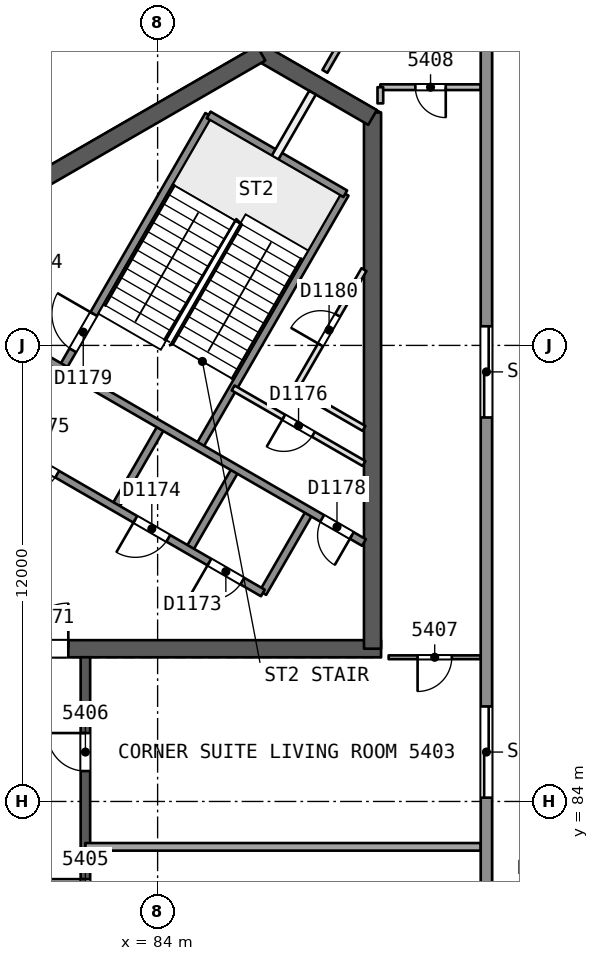
"""IFC4 building model, lengths in metres.
Left out: names, types, materials, properties, quantities, classifications, styles, units other than length and angle.
Written with IfcOpenShell. Run it as: python <this file> out.ifc"""

import sys

from ifc_helpers import new_model, si_unit, direction, frame, frame_2d, origin, place, context, subcontext, project, spatial, rectangle, extrude, element, fill, save


model = new_model("IFC4")
c1 = context("Model", 3, precision=1e-05, world=origin(), true_north=direction((0.0, 1.0)))
c2 = subcontext(c1, "Body", "Model", "MODEL_VIEW")
j1 = project(units=[si_unit("LENGTHUNIT", "METRE"), si_unit("PLANEANGLEUNIT", "RADIAN")], contexts=[c1])
p1 = place(None, origin())
s1 = spatial("IfcSite", under=j1, at=p1, CompositionType="ELEMENT")
p2 = place(p1, origin())
s2 = spatial("IfcBuilding", under=s1, at=p2, CompositionType="ELEMENT")
p3 = place(p2, frame((0.0, 0.0, 220.6)))
s3 = spatial("IfcBuildingStorey", under=s2, at=p3, CompositionType="ELEMENT", Elevation=220.6)
p4 = place(p3, frame((79.63, 88.019, 0.0), z_axis=(0.0, 0.0, 1.0), x_axis=(1.0, 0.0, 0.0)))
e1 = element("IfcWall", 1, at=p4, inside=s3, PredefinedType="SHEAR", context=c2, shape_type="SweptSolid", body=[
    extrude(rectangle(XDim=10.25, YDim=0.45, at=frame_2d((5.125, 0.0))), origin(), (0.0, 0.0, 1.0), 3.7),
])
p5 = place(p4, frame((0.82, 0.0, 0.0)))
e2 = element("IfcOpeningElement", 2, at=p5, cuts=e1, PredefinedType="OPENING", context=c2, shape_type="SweptSolid", body=[
    extrude(rectangle(XDim=1.2, YDim=2.1, at=frame_2d((0.6, 1.05))), frame((0.0, 0.235, 0.0), z_axis=(0.0, -1.0, 0.0), x_axis=(1.0, 0.0, 0.0)), (0.0, 0.0, 1.0), 0.471),
])
p6 = place(p3, frame((89.655, 88.019, 0.0), z_axis=(0.0, 0.0, 1.0), x_axis=(0.0, 1.0, 0.0)))
e3 = element("IfcWall", 3, at=p6, inside=s3, PredefinedType="SHEAR", context=c2, shape_type="SweptSolid", body=[
    extrude(rectangle(XDim=14.108, YDim=0.45, at=frame_2d((7.054, 0.0))), origin(), (0.0, 0.0, 1.0), 3.7),
])
p7 = place(p3, frame((89.655, 101.998, 0.0), z_axis=(0.0, 0.0, 1.0), x_axis=(-0.866042179588, 0.49997094233, 0.0)))
e4 = element("IfcWall", 4, at=p7, inside=s3, PredefinedType="SHEAR", context=c2, shape_type="SweptSolid", body=[
    extrude(rectangle(XDim=3.515, YDim=0.45, at=frame_2d((1.758, 0.0))), origin(), (0.0, 0.0, 1.0), 3.7),
])
p8 = place(p3, frame((86.723, 103.69, 0.0), z_axis=(0.0, 0.0, 1.0), x_axis=(-0.866022713978, -0.500004658852, 0.0)))
e5 = element("IfcWall", 5, at=p8, inside=s3, PredefinedType="SHEAR", context=c2, shape_type="SweptSolid", body=[
    extrude(rectangle(XDim=14.203, YDim=0.45, at=frame_2d((7.102, 0.0))), origin(), (0.0, 0.0, 1.0), 3.7),
])
p9 = place(p3, frame((82.1, 72.206, 0.0), z_axis=(0.0, 0.0, 1.0), x_axis=(0.0, 1.0, 0.0)))
e6 = element("IfcWall", 6, at=p9, inside=s3, PredefinedType="SHEAR", context=c2, shape_type="SweptSolid", body=[
    extrude(rectangle(XDim=15.588, YDim=0.25, at=frame_2d((7.794, 0.0))), origin(), (0.0, 0.0, 1.0), 3.3),
])
p10 = place(p9, frame((2.15, 0.0, 0.0)))
e7 = element("IfcOpeningElement", 7, at=p10, cuts=e6, PredefinedType="OPENING", context=c2, shape_type="SweptSolid", body=[
    extrude(rectangle(XDim=1.0, YDim=2.1, at=frame_2d((0.5, 1.05))), frame((0.0, 0.135, 0.0), z_axis=(0.0, -1.0, 0.0), x_axis=(1.0, 0.0, 0.0)), (0.0, 0.0, 1.0), 0.271),
])
p11 = place(p9, frame((8.75, 0.0, 0.0)))
e8 = element("IfcOpeningElement", 8, at=p11, cuts=e6, PredefinedType="OPENING", context=c2, shape_type="SweptSolid", body=[
    extrude(rectangle(XDim=1.0, YDim=2.1, at=frame_2d((0.5, 1.05))), frame((0.0, 0.135, 0.0), z_axis=(0.0, -1.0, 0.0), x_axis=(1.0, 0.0, 0.0)), (0.0, 0.0, 1.0), 0.271),
])
p12 = place(p9, frame((12.594, 0.0, 0.0)))
e9 = element("IfcOpeningElement", 9, at=p12, cuts=e6, PredefinedType="OPENING", context=c2, shape_type="SweptSolid", body=[
    extrude(rectangle(XDim=1.0, YDim=2.1, at=frame_2d((0.5, 1.05))), frame((0.0, 0.135, 0.0), z_axis=(0.0, -1.0, 0.0), x_axis=(1.0, 0.0, 0.0)), (0.0, 0.0, 1.0), 0.271),
])
p13 = place(p3, frame((92.503, 82.806, 0.0), z_axis=(0.0, 0.0, 1.0), x_axis=(-1.0, 0.0, 0.0)))
e10 = element("IfcWall", 10, at=p13, inside=s3, PredefinedType="PARTITIONING", context=c2, shape_type="SweptSolid", body=[
    extrude(rectangle(XDim=10.403, YDim=0.2, at=frame_2d((5.201, 0.0))), origin(), (0.0, 0.0, 1.0), 3.3),
])
p14 = place(p3, frame((92.503, 87.794, 0.0), z_axis=(0.0, 0.0, 1.0), x_axis=(-1.0, 0.0, 0.0)))
e11 = element("IfcWall", 11, at=p14, inside=s3, PredefinedType="PARTITIONING", context=c2, shape_type="SweptSolid", body=[
    extrude(rectangle(XDim=2.424, YDim=0.1, at=frame_2d((1.212, 0.0))), origin(), (0.0, 0.0, 1.0), 3.3),
])
p15 = place(p14, frame((0.762, 0.0, 0.0)))
e12 = element("IfcOpeningElement", 12, at=p15, cuts=e11, PredefinedType="OPENING", context=c2, shape_type="SweptSolid", body=[
    extrude(rectangle(XDim=0.9, YDim=2.1, at=frame_2d((0.45, 1.05))), frame((0.0, 0.061, 0.0), z_axis=(0.0, -1.0, 0.0), x_axis=(1.0, 0.0, 0.0)), (0.0, 0.0, 1.0), 0.121),
])
p16 = place(p3, frame((92.503, 102.794, 0.0), z_axis=(0.0, 0.0, 1.0), x_axis=(-1.0, 0.0, 0.0)))
e13 = element("IfcWall", 13, at=p16, inside=s3, PredefinedType="PARTITIONING", context=c2, shape_type="SweptSolid", body=[
    extrude(rectangle(XDim=2.642, YDim=0.15, at=frame_2d((1.321, 0.0))), origin(), (0.0, 0.0, 1.0), 3.3),
])
p17 = place(p16, frame((0.921, 0.0, 0.0)))
e14 = element("IfcOpeningElement", 14, at=p17, cuts=e13, PredefinedType="OPENING", context=c2, shape_type="SweptSolid", body=[
    extrude(rectangle(XDim=0.8, YDim=2.1, at=frame_2d((0.4, 1.05))), frame((0.0, 0.085, 0.0), z_axis=(0.0, -1.0, 0.0), x_axis=(1.0, 0.0, 0.0)), (0.0, 0.0, 1.0), 0.171),
])
p18 = place(p3, frame((89.861, 102.794, 0.0), z_axis=(0.0, 0.0, 1.0), x_axis=(0.0, -1.0, 0.0)))
e15 = element("IfcWall", 15, at=p18, inside=s3, PredefinedType="PARTITIONING", context=c2, shape_type="SweptSolid", body=[
    extrude(rectangle(XDim=0.426, YDim=0.15, at=frame_2d((0.213, 0.0))), origin(), (0.0, 0.0, 1.0), 3.3),
])
p19 = place(p3, frame((90.33, 106.55, 0.0), z_axis=(0.0, 0.0, 1.0), x_axis=(-0.499980071345, -0.866036909293, 0.0)))
e16 = element("IfcWall", 16, at=p19, inside=s3, PredefinedType="PARTITIONING", context=c2, shape_type="SweptSolid", body=[
    extrude(rectangle(XDim=3.856, YDim=0.15, at=frame_2d((1.928, 0.0))), origin(), (0.0, 0.0, 1.0), 3.3),
])
p20 = place(p3, frame((92.652, 105.381, 0.0), z_axis=(0.0, 0.0, 1.0), x_axis=(0.0, -1.0, 0.0)))
e17 = element("IfcWall", 17, at=p20, inside=s3, PredefinedType="SOLIDWALL", context=c2, shape_type="SweptSolid", body=[
    extrude(rectangle(XDim=50.762, YDim=0.3, at=frame_2d((25.381, 0.0))), origin(), (0.0, 0.0, 1.0), 3.3),
])
p21 = place(p20, frame((29.325, 0.0, 0.0)))
e18 = element("IfcOpeningElement", 18, at=p21, cuts=e17, PredefinedType="OPENING", context=c2, shape_type="SweptSolid", body=[
    extrude(rectangle(XDim=2.4, YDim=2.4, at=frame_2d((1.2, 1.2))), frame((0.0, 0.161, 0.0), z_axis=(0.0, -1.0, 0.0), x_axis=(1.0, 0.0, 0.0)), (0.0, 0.0, 1.0), 0.321),
])
p22 = place(p20, frame((39.492, 0.0, 0.0)))
e19 = element("IfcOpeningElement", 19, at=p22, cuts=e17, PredefinedType="OPENING", context=c2, shape_type="SweptSolid", body=[
    extrude(rectangle(XDim=2.4, YDim=2.4, at=frame_2d((1.2, 1.2))), frame((0.0, 0.161, 0.0), z_axis=(0.0, -1.0, 0.0), x_axis=(1.0, 0.0, 0.0)), (0.0, 0.0, 1.0), 0.321),
])
p23 = place(p20, frame((18.881, 0.0, 0.0)))
e20 = element("IfcOpeningElement", 20, at=p23, cuts=e17, PredefinedType="OPENING", context=c2, shape_type="SweptSolid", body=[
    extrude(rectangle(XDim=2.4, YDim=2.4, at=frame_2d((1.2, 1.2))), frame((0.0, 0.161, 0.0), z_axis=(0.0, -1.0, 0.0), x_axis=(1.0, 0.0, 0.0)), (0.0, 0.0, 1.0), 0.321),
])
p24 = place(p20, frame((8.878, 0.0, 0.0)))
e21 = element("IfcOpeningElement", 21, at=p24, cuts=e17, PredefinedType="OPENING", context=c2, shape_type="SweptSolid", body=[
    extrude(rectangle(XDim=2.4, YDim=2.4, at=frame_2d((1.2, 1.2))), frame((0.0, 0.161, 0.0), z_axis=(0.0, -1.0, 0.0), x_axis=(1.0, 0.0, 0.0)), (0.0, 0.0, 1.0), 0.321),
])
p25 = place(p20, frame((24.025, 0.0, 0.0)))
e22 = element("IfcOpeningElement", 22, at=p25, cuts=e17, PredefinedType="OPENING", context=c2, shape_type="SweptSolid", body=[
    extrude(rectangle(XDim=2.4, YDim=2.4, at=frame_2d((1.2, 1.2))), frame((0.0, 0.161, 0.0), z_axis=(0.0, -1.0, 0.0), x_axis=(1.0, 0.0, 0.0)), (0.0, 0.0, 1.0), 0.321),
])
p26 = place(p3, frame((44.193, 82.596, 0.0), z_axis=(0.0, 0.0, 1.0), x_axis=(0.866024521231, 0.500001528624, 0.0)))
e23 = element("IfcWall", 23, at=p26, inside=s3, PredefinedType="SOLIDWALL", context=c2, shape_type="SweptSolid", body=[
    extrude(rectangle(XDim=50.762, YDim=0.3, at=frame_2d((25.381, 0.0))), origin(), (0.0, 0.0, 1.0), 3.3),
])
p27 = place(p26, frame((24.337, 0.0, 0.0)))
e24 = element("IfcOpeningElement", 24, at=p27, cuts=e23, PredefinedType="OPENING", context=c2, shape_type="SweptSolid", body=[
    extrude(rectangle(XDim=2.4, YDim=2.4, at=frame_2d((1.2, 1.2))), frame((0.0, 0.161, 0.0), z_axis=(0.0, -1.0, 0.0), x_axis=(1.0, 0.0, 0.0)), (0.0, 0.0, 1.0), 0.321),
])
p28 = place(p26, frame((29.325, 0.0, 0.0)))
e25 = element("IfcOpeningElement", 25, at=p28, cuts=e23, PredefinedType="OPENING", context=c2, shape_type="SweptSolid", body=[
    extrude(rectangle(XDim=2.4, YDim=2.4, at=frame_2d((1.2, 1.2))), frame((0.0, 0.161, 0.0), z_axis=(0.0, -1.0, 0.0), x_axis=(1.0, 0.0, 0.0)), (0.0, 0.0, 1.0), 0.321),
])
p29 = place(p26, frame((39.492, 0.0, 0.0)))
e26 = element("IfcOpeningElement", 26, at=p29, cuts=e23, PredefinedType="OPENING", context=c2, shape_type="SweptSolid", body=[
    extrude(rectangle(XDim=2.4, YDim=2.4, at=frame_2d((1.2, 1.2))), frame((0.0, 0.161, 0.0), z_axis=(0.0, -1.0, 0.0), x_axis=(1.0, 0.0, 0.0)), (0.0, 0.0, 1.0), 0.321),
])
p30 = place(p26, frame((19.193, 0.0, 0.0)))
e27 = element("IfcOpeningElement", 27, at=p30, cuts=e23, PredefinedType="OPENING", context=c2, shape_type="SweptSolid", body=[
    extrude(rectangle(XDim=2.4, YDim=2.4, at=frame_2d((1.2, 1.2))), frame((0.0, 0.161, 0.0), z_axis=(0.0, -1.0, 0.0), x_axis=(1.0, 0.0, 0.0)), (0.0, 0.0, 1.0), 0.321),
])
p31 = place(p26, frame((8.878, 0.0, 0.0)))
e28 = element("IfcOpeningElement", 28, at=p31, cuts=e23, PredefinedType="OPENING", context=c2, shape_type="SweptSolid", body=[
    extrude(rectangle(XDim=2.4, YDim=2.4, at=frame_2d((1.2, 1.2))), frame((0.0, 0.161, 0.0), z_axis=(0.0, -1.0, 0.0), x_axis=(1.0, 0.0, 0.0)), (0.0, 0.0, 1.0), 0.321),
])
p32 = place(p3, frame((86.77, 89.486, 0.0), z_axis=(0.0, 0.0, 1.0), x_axis=(0.499961042966, 0.86604789447, 0.0)))
e29 = element("IfcWall", 29, at=p32, inside=s3, PredefinedType="SOLIDWALL", context=c2, shape_type="SweptSolid", body=[
    extrude(rectangle(XDim=2.48, YDim=0.2, at=frame_2d((1.24, 0.0))), origin(), (0.0, 0.0, 1.0), 3.3),
])
p33 = place(p3, frame((87.621, 94.86, 0.0), z_axis=(0.0, 0.0, 1.0), x_axis=(0.499993116331, 0.866029378036, 0.0)))
e30 = element("IfcWall", 30, at=p33, inside=s3, PredefinedType="PARTITIONING", context=c2, shape_type="SweptSolid", body=[
    extrude(rectangle(XDim=3.618, YDim=0.15, at=frame_2d((1.809, 0.0))), origin(), (0.0, 0.0, 1.0), 3.3),
])
p34 = place(p33, frame((1.332, 0.0, 0.0)))
e31 = element("IfcOpeningElement", 31, at=p34, cuts=e30, PredefinedType="OPENING", context=c2, shape_type="SweptSolid", body=[
    extrude(rectangle(XDim=0.9, YDim=2.1, at=frame_2d((0.45, 1.05))), frame((0.0, 0.085, 0.0), z_axis=(0.0, -1.0, 0.0), x_axis=(1.0, 0.0, 0.0)), (0.0, 0.0, 1.0), 0.171),
])
p35 = place(p3, frame((84.821, 90.611, 0.0), z_axis=(0.0, 0.0, 1.0), x_axis=(0.499961042966, 0.86604789447, 0.0)))
e32 = element("IfcWall", 32, at=p35, inside=s3, PredefinedType="SOLIDWALL", context=c2, shape_type="SweptSolid", body=[
    extrude(rectangle(XDim=2.48, YDim=0.2, at=frame_2d((1.24, 0.0))), origin(), (0.0, 0.0, 1.0), 3.3),
])
p36 = place(p3, frame((85.087, 93.321, 0.0), z_axis=(0.0, 0.0, 1.0), x_axis=(0.500019787375, 0.866013979237, 0.0)))
e33 = element("IfcWall", 33, at=p36, inside=s3, PredefinedType="SOLIDWALL", context=c2, shape_type="SweptSolid", body=[
    extrude(rectangle(XDim=7.7, YDim=0.2, at=frame_2d((3.85, 0.0))), origin(), (0.0, 0.0, 1.0), 3.3),
])
p37 = place(p3, frame((82.873, 91.736, 0.0), z_axis=(0.0, 0.0, 1.0), x_axis=(0.499961042966, 0.86604789447, 0.0)))
e34 = element("IfcWall", 34, at=p37, inside=s3, PredefinedType="SOLIDWALL", context=c2, shape_type="SweptSolid", body=[
    extrude(rectangle(XDim=2.48, YDim=0.2, at=frame_2d((1.24, 0.0))), origin(), (0.0, 0.0, 1.0), 3.3),
])
p38 = place(p3, frame((87.09, 100.94, 0.0), z_axis=(0.0, 0.0, 1.0), x_axis=(0.500011643316, 0.866018681408, 0.0)))
e35 = element("IfcWall", 35, at=p38, inside=s3, PredefinedType="PARTITIONING", context=c2, shape_type="SweptSolid", body=[
    extrude(rectangle(XDim=1.973, YDim=0.2, at=frame_2d((0.987, 0.0))), origin(), (0.0, 0.0, 1.0), 3.3),
])
p39 = place(p3, frame((81.493, 95.396, 0.0), z_axis=(0.0, 0.0, 1.0), x_axis=(0.500006057782, 0.866021906294, 0.0)))
e36 = element("IfcWall", 36, at=p39, inside=s3, PredefinedType="SOLIDWALL", context=c2, shape_type="SweptSolid", body=[
    extrude(rectangle(XDim=7.7, YDim=0.2, at=frame_2d((3.85, 0.0))), origin(), (0.0, 0.0, 1.0), 3.3),
])
p40 = place(p39, frame((0.55, 0.0, 0.0)))
e37 = element("IfcOpeningElement", 37, at=p40, cuts=e36, PredefinedType="OPENING", context=c2, shape_type="SweptSolid", body=[
    extrude(rectangle(XDim=1.1, YDim=2.1, at=frame_2d((0.55, 1.05))), frame((0.0, 0.11, 0.0), z_axis=(0.0, -1.0, 0.0), x_axis=(1.0, 0.0, 0.0)), (0.0, 0.0, 1.0), 0.221),
])
p41 = place(p3, frame((86.77, 89.486, 0.0), z_axis=(0.0, 0.0, 1.0), x_axis=(-0.86601811187, 0.500012629753, 0.0)))
e38 = element("IfcWall", 38, at=p41, inside=s3, PredefinedType="SOLIDWALL", context=c2, shape_type="SweptSolid", body=[
    extrude(rectangle(XDim=10.9, YDim=0.2, at=frame_2d((5.45, 0.0))), origin(), (0.0, 0.0, 1.0), 3.3),
])
p42 = place(p41, frame((0.625, 0.0, 0.0)))
e39 = element("IfcOpeningElement", 39, at=p42, cuts=e38, PredefinedType="OPENING", context=c2, shape_type="SweptSolid", body=[
    extrude(rectangle(XDim=1.0, YDim=2.1, at=frame_2d((0.5, 1.05))), frame((0.0, 0.11, 0.0), z_axis=(0.0, -1.0, 0.0), x_axis=(1.0, 0.0, 0.0)), (0.0, 0.0, 1.0), 0.221),
])
p43 = place(p41, frame((2.875, 0.0, 0.0)))
e40 = element("IfcOpeningElement", 40, at=p43, cuts=e38, PredefinedType="OPENING", context=c2, shape_type="SweptSolid", body=[
    extrude(rectangle(XDim=1.0, YDim=2.1, at=frame_2d((0.5, 1.05))), frame((0.0, 0.11, 0.0), z_axis=(0.0, -1.0, 0.0), x_axis=(1.0, 0.0, 0.0)), (0.0, 0.0, 1.0), 0.221),
])
p44 = place(p41, frame((6.25, 0.0, 0.0)))
e41 = element("IfcOpeningElement", 41, at=p44, cuts=e38, PredefinedType="OPENING", context=c2, shape_type="SweptSolid", body=[
    extrude(rectangle(XDim=1.0, YDim=2.1, at=frame_2d((0.5, 1.05))), frame((0.0, 0.11, 0.0), z_axis=(0.0, -1.0, 0.0), x_axis=(1.0, 0.0, 0.0)), (0.0, 0.0, 1.0), 0.221),
])
p45 = place(p3, frame((89.43, 90.814, 0.0), z_axis=(0.0, 0.0, 1.0), x_axis=(-0.866018983788, 0.500011119594, 0.0)))
e42 = element("IfcWall", 42, at=p45, inside=s3, PredefinedType="SOLIDWALL", context=c2, shape_type="SweptSolid", body=[
    extrude(rectangle(XDim=10.64, YDim=0.2, at=frame_2d((5.32, 0.0))), origin(), (0.0, 0.0, 1.0), 3.3),
])
p46 = place(p45, frame((0.37, 0.0, 0.0)))
e43 = element("IfcOpeningElement", 43, at=p46, cuts=e42, PredefinedType="OPENING", context=c2, shape_type="SweptSolid", body=[
    extrude(rectangle(XDim=0.9, YDim=2.1, at=frame_2d((0.45, 1.05))), frame((0.0, 0.11, 0.0), z_axis=(0.0, -1.0, 0.0), x_axis=(1.0, 0.0, 0.0)), (0.0, 0.0, 1.0), 0.221),
])
p47 = place(p3, frame((89.43, 92.892, 0.0), z_axis=(0.0, 0.0, 1.0), x_axis=(-0.866019912421, 0.500009511199, 0.0)))
e44 = element("IfcWall", 44, at=p47, inside=s3, PredefinedType="PARTITIONING", context=c2, shape_type="SweptSolid", body=[
    extrude(rectangle(XDim=3.976, YDim=0.15, at=frame_2d((1.988, 0.0))), origin(), (0.0, 0.0, 1.0), 3.3),
])
p48 = place(p47, frame((1.538, 0.0, 0.0)))
e45 = element("IfcOpeningElement", 45, at=p48, cuts=e44, PredefinedType="OPENING", context=c2, shape_type="SweptSolid", body=[
    extrude(rectangle(XDim=0.9, YDim=2.1, at=frame_2d((0.45, 1.05))), frame((0.0, 0.085, 0.0), z_axis=(0.0, -1.0, 0.0), x_axis=(1.0, 0.0, 0.0)), (0.0, 0.0, 1.0), 0.171),
])
p49 = place(p3, frame((89.43, 93.816, 0.0), z_axis=(0.0, 0.0, 1.0), x_axis=(-0.866004557827, 0.500036104519, 0.0)))
e46 = element("IfcWall", 46, at=p49, inside=s3, PredefinedType="PARTITIONING", context=c2, shape_type="SweptSolid", body=[
    extrude(rectangle(XDim=2.089, YDim=0.15, at=frame_2d((1.044, 0.0))), origin(), (0.0, 0.0, 1.0), 3.3),
])
p50 = place(p3, frame((88.937, 99.99, 0.0), z_axis=(0.0, 0.0, 1.0), x_axis=(-0.866004344652, 0.500036473714, 0.0)))
e47 = element("IfcWall", 47, at=p50, inside=s3, PredefinedType="SOLIDWALL", context=c2, shape_type="SweptSolid", body=[
    extrude(rectangle(XDim=4.15, YDim=0.2, at=frame_2d((2.075, 0.0))), origin(), (0.0, 0.0, 1.0), 3.3),
])
p51 = place(p11, origin())
e48 = element("IfcDoor", 48, at=p51, inside=s3, OperationType="SINGLE_SWING_RIGHT", PredefinedType="NOTDEFINED", context=c2, shape_type="SweptSolid", body=[
    extrude(rectangle(XDim=1.0, YDim=2.1, at=frame_2d((0.5, 1.05))), frame((0.0, 0.025, 0.0), z_axis=(0.0, -1.0, 0.0), x_axis=(1.0, 0.0, 0.0)), (0.0, 0.0, 1.0), 0.05),
])
fill(e8, e48)
p52 = place(p12, origin())
e49 = element("IfcDoor", 49, at=p52, inside=s3, OperationType="SINGLE_SWING_RIGHT", PredefinedType="NOTDEFINED", context=c2, shape_type="SweptSolid", body=[
    extrude(rectangle(XDim=1.0, YDim=2.1, at=frame_2d((0.5, 1.05))), frame((0.0, 0.025, 0.0), z_axis=(0.0, -1.0, 0.0), x_axis=(1.0, 0.0, 0.0)), (0.0, 0.0, 1.0), 0.05),
])
fill(e9, e49)
p53 = place(p15, origin())
e50 = element("IfcDoor", 50, at=p53, inside=s3, OperationType="SINGLE_SWING_RIGHT", PredefinedType="NOTDEFINED", context=c2, shape_type="SweptSolid", body=[
    extrude(rectangle(XDim=0.9, YDim=2.1, at=frame_2d((0.45, 1.05))), frame((0.0, 0.025, 0.0), z_axis=(0.0, -1.0, 0.0), x_axis=(1.0, 0.0, 0.0)), (0.0, 0.0, 1.0), 0.05),
])
fill(e12, e50)
p54 = place(p17, origin())
e51 = element("IfcDoor", 51, at=p54, inside=s3, OperationType="SINGLE_SWING_LEFT", PredefinedType="NOTDEFINED", context=c2, shape_type="SweptSolid", body=[
    extrude(rectangle(XDim=0.8, YDim=2.1, at=frame_2d((0.4, 1.05))), frame((0.0, 0.025, 0.0), z_axis=(0.0, -1.0, 0.0), x_axis=(1.0, 0.0, 0.0)), (0.0, 0.0, 1.0), 0.05),
])
fill(e14, e51)
p55 = place(p23, origin())
e52 = element("IfcDoor", 52, at=p55, inside=s3, OperationType="SLIDING_TO_LEFT", PredefinedType="NOTDEFINED", context=c2, shape_type="SweptSolid", body=[
    extrude(rectangle(XDim=2.4, YDim=2.4, at=frame_2d((1.2, 1.2))), frame((0.0, 0.025, 0.0), z_axis=(0.0, -1.0, 0.0), x_axis=(1.0, 0.0, 0.0)), (0.0, 0.0, 1.0), 0.05),
])
fill(e20, e52)
p56 = place(p24, origin())
e53 = element("IfcDoor", 53, at=p56, inside=s3, OperationType="SLIDING_TO_RIGHT", PredefinedType="NOTDEFINED", context=c2, shape_type="SweptSolid", body=[
    extrude(rectangle(XDim=2.4, YDim=2.4, at=frame_2d((1.2, 1.2))), frame((0.0, 0.025, 0.0), z_axis=(0.0, -1.0, 0.0), x_axis=(1.0, 0.0, 0.0)), (0.0, 0.0, 1.0), 0.05),
])
fill(e21, e53)
p57 = place(p5, origin())
e54 = element("IfcDoor", 54, at=p57, inside=s3, OperationType="SINGLE_SWING_RIGHT", PredefinedType="NOTDEFINED", context=c2, shape_type="SweptSolid", body=[
    extrude(rectangle(XDim=1.2, YDim=2.1, at=frame_2d((0.6, 1.05))), frame((0.0, 0.025, 0.0), z_axis=(0.0, -1.0, 0.0), x_axis=(1.0, 0.0, 0.0)), (0.0, 0.0, 1.0), 0.05),
])
fill(e2, e54)
p58 = place(p42, origin())
e55 = element("IfcDoor", 55, at=p58, inside=s3, OperationType="SINGLE_SWING_RIGHT", PredefinedType="NOTDEFINED", context=c2, shape_type="SweptSolid", body=[
    extrude(rectangle(XDim=1.0, YDim=2.1, at=frame_2d((0.5, 1.05))), frame((0.0, 0.025, 0.0), z_axis=(0.0, -1.0, 0.0), x_axis=(1.0, 0.0, 0.0)), (0.0, 0.0, 1.0), 0.05),
])
fill(e39, e55)
p59 = place(p43, origin())
e56 = element("IfcDoor", 56, at=p59, inside=s3, OperationType="SINGLE_SWING_RIGHT", PredefinedType="NOTDEFINED", context=c2, shape_type="SweptSolid", body=[
    extrude(rectangle(XDim=1.0, YDim=2.1, at=frame_2d((0.5, 1.05))), frame((0.0, 0.025, 0.0), z_axis=(0.0, -1.0, 0.0), x_axis=(1.0, 0.0, 0.0)), (0.0, 0.0, 1.0), 0.05),
])
fill(e40, e56)
p60 = place(p44, origin())
e57 = element("IfcDoor", 57, at=p60, inside=s3, OperationType="SINGLE_SWING_RIGHT", PredefinedType="NOTDEFINED", context=c2, shape_type="SweptSolid", body=[
    extrude(rectangle(XDim=1.0, YDim=2.1, at=frame_2d((0.5, 1.05))), frame((0.0, 0.025, 0.0), z_axis=(0.0, -1.0, 0.0), x_axis=(1.0, 0.0, 0.0)), (0.0, 0.0, 1.0), 0.05),
])
fill(e41, e57)
p61 = place(p48, origin())
e58 = element("IfcDoor", 58, at=p61, inside=s3, OperationType="SINGLE_SWING_RIGHT", PredefinedType="NOTDEFINED", context=c2, shape_type="SweptSolid", body=[
    extrude(rectangle(XDim=0.9, YDim=2.1, at=frame_2d((0.45, 1.05))), frame((0.0, 0.025, 0.0), z_axis=(0.0, -1.0, 0.0), x_axis=(1.0, 0.0, 0.0)), (0.0, 0.0, 1.0), 0.05),
])
fill(e45, e58)
p62 = place(p46, origin())
e59 = element("IfcDoor", 59, at=p62, inside=s3, OperationType="SINGLE_SWING_LEFT", PredefinedType="NOTDEFINED", context=c2, shape_type="SweptSolid", body=[
    extrude(rectangle(XDim=0.9, YDim=2.1, at=frame_2d((0.45, 1.05))), frame((0.0, 0.025, 0.0), z_axis=(0.0, -1.0, 0.0), x_axis=(1.0, 0.0, 0.0)), (0.0, 0.0, 1.0), 0.05),
])
fill(e43, e59)
p63 = place(p40, origin())
e60 = element("IfcDoor", 60, at=p63, inside=s3, OperationType="SINGLE_SWING_RIGHT", PredefinedType="NOTDEFINED", context=c2, shape_type="SweptSolid", body=[
    extrude(rectangle(XDim=1.1, YDim=2.1, at=frame_2d((0.55, 1.05))), frame((0.0, 0.025, 0.0), z_axis=(0.0, -1.0, 0.0), x_axis=(1.0, 0.0, 0.0)), (0.0, 0.0, 1.0), 0.05),
])
fill(e37, e60)
p64 = place(p34, origin())
e61 = element("IfcDoor", 61, at=p64, inside=s3, OperationType="SINGLE_SWING_LEFT", PredefinedType="NOTDEFINED", context=c2, shape_type="SweptSolid", body=[
    extrude(rectangle(XDim=0.9, YDim=2.1, at=frame_2d((0.45, 1.05))), frame((0.0, 0.025, 0.0), z_axis=(0.0, -1.0, 0.0), x_axis=(1.0, 0.0, 0.0)), (0.0, 0.0, 1.0), 0.05),
])
fill(e31, e61)
save(model, sys.argv[1])
